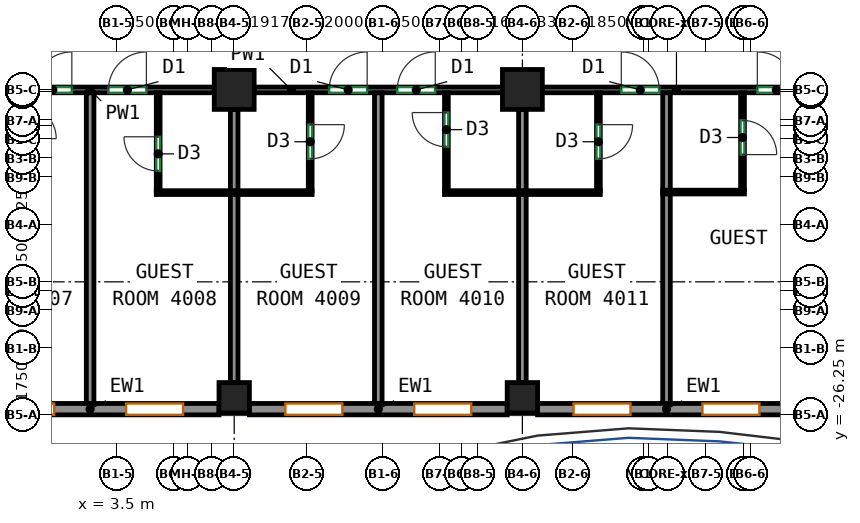
"""IFC4 building model, lengths in metres.
Left out: names, types, materials, properties, quantities, classifications, styles, units other than length and angle.
Written with IfcOpenShell. Run it as: python <this file> out.ifc"""

import sys

from ifc_helpers import new_model, si_unit, direction, frame, frame_2d, origin, origin_2d, place, context, subcontext, project, spatial, rectangle, extrude, source, transform, mapped, element, fill, save


model = new_model("IFC4")
c1 = context("Model", 3, precision=1e-05, world=origin(), true_north=direction((0.0, 1.0)))
c2 = subcontext(c1, "Body", "Model", "MODEL_VIEW")
j1 = project(units=[si_unit("LENGTHUNIT", "METRE"), si_unit("PLANEANGLEUNIT", "RADIAN")], contexts=[c1])
p1 = place(None, origin())
s1 = spatial("IfcSite", under=j1, at=p1, CompositionType="ELEMENT")
p2 = place(p1, origin())
s2 = spatial("IfcBuilding", under=s1, at=p2, CompositionType="ELEMENT")
p3 = place(p2, frame((0.0, 0.0, 171.9)))
s3 = spatial("IfcBuildingStorey", under=s2, at=p3, CompositionType="ELEMENT", Elevation=171.9)
m1 = source(origin(), c2, "Body", "SweptSolid", [
    extrude(rectangle(XDim=0.8, YDim=0.8, at=origin_2d()), origin(), (0.0, 0.0, 1.0), 3.12),
])
p4 = place(p3, frame((6.583, -25.8, 0.0), z_axis=(0.0, 0.0, 1.0), x_axis=(1.0, 0.0, 0.0)))
e1 = element("IfcColumn", 1, at=p4, inside=s3, PredefinedType="COLUMN", context=c2, shape_type="MappedRepresentation", body=[
    mapped(m1, transform((0.0, 0.0, 0.0))),
])
m2 = source(origin(), c2, "Body", "SweptSolid", [
    extrude(rectangle(XDim=1.05, YDim=1.05, at=origin_2d()), origin(), (0.0, 0.0, 1.0), 3.12),
])
p5 = place(p3, frame((6.583, -17.688, 0.0), z_axis=(0.0, 0.0, 1.0), x_axis=(1.0, 0.0, 0.0)))
e2 = element("IfcColumn", 2, at=p5, inside=s3, PredefinedType="COLUMN", context=c2, shape_type="MappedRepresentation", body=[
    mapped(m2, transform((0.0, 0.0, 0.0))),
])
p6 = place(p3, frame((14.167, -25.8, 0.0), z_axis=(0.0, 0.0, 1.0), x_axis=(1.0, 0.0, 0.0)))
e3 = element("IfcColumn", 3, at=p6, inside=s3, PredefinedType="COLUMN", context=c2, shape_type="MappedRepresentation", body=[
    mapped(m1, transform((0.0, 0.0, 0.0))),
])
p7 = place(p3, frame((14.167, -17.688, 0.0), z_axis=(0.0, 0.0, 1.0), x_axis=(1.0, 0.0, 0.0)))
e4 = element("IfcColumn", 4, at=p7, inside=s3, PredefinedType="COLUMN", context=c2, shape_type="MappedRepresentation", body=[
    mapped(m2, transform((0.0, 0.0, 0.0))),
])
m3 = source(origin(), c2, "Body", "SweptSolid", [
    extrude(rectangle(XDim=6.783, YDim=0.3, at=frame_2d((3.392, 0.0))), origin(), (0.0, 0.0, 1.0), 3.12),
])
p8 = place(p3, frame((-0.6, -26.1, 0.0), z_axis=(0.0, 0.0, 1.0), x_axis=(1.0, 0.0, 0.0)))
e5 = element("IfcWall", 5, at=p8, inside=s3, PredefinedType="SOLIDWALL", context=c2, shape_type="MappedRepresentation", body=[
    mapped(m3, transform((0.0, 0.0, 0.0))),
])
p9 = place(p8, frame((0.946, 0.0, 0.85)))
e6 = element("IfcOpeningElement", 6, at=p9, cuts=e5, PredefinedType="OPENING", context=c2, shape_type="SweptSolid", body=[
    extrude(rectangle(XDim=1.5, YDim=1.95, at=frame_2d((0.75, 0.975))), frame((0.0, 0.16, 0.0), z_axis=(0.0, -1.0, 0.0), x_axis=(1.0, 0.0, 0.0)), (0.0, 0.0, 1.0), 0.32),
])
p10 = place(p8, frame((4.337, 0.0, 0.85)))
e7 = element("IfcOpeningElement", 7, at=p10, cuts=e5, PredefinedType="OPENING", context=c2, shape_type="SweptSolid", body=[
    extrude(rectangle(XDim=1.5, YDim=1.95, at=frame_2d((0.75, 0.975))), frame((0.0, 0.16, 0.0), z_axis=(0.0, -1.0, 0.0), x_axis=(1.0, 0.0, 0.0)), (0.0, 0.0, 1.0), 0.32),
])
m4 = source(origin(), c2, "Body", "SweptSolid", [
    extrude(rectangle(XDim=6.783, YDim=0.3, at=frame_2d((3.392, 0.0))), origin(), (0.0, 0.0, 1.0), 3.12),
])
p11 = place(p3, frame((6.983, -26.1, 0.0), z_axis=(0.0, 0.0, 1.0), x_axis=(1.0, 0.0, 0.0)))
e8 = element("IfcWall", 8, at=p11, inside=s3, PredefinedType="SOLIDWALL", context=c2, shape_type="MappedRepresentation", body=[
    mapped(m4, transform((0.0, 0.0, 0.0))),
])
p12 = place(p11, frame((0.946, 0.0, 0.85)))
e9 = element("IfcOpeningElement", 9, at=p12, cuts=e8, PredefinedType="OPENING", context=c2, shape_type="SweptSolid", body=[
    extrude(rectangle(XDim=1.5, YDim=1.95, at=frame_2d((0.75, 0.975))), frame((0.0, 0.16, 0.0), z_axis=(0.0, -1.0, 0.0), x_axis=(1.0, 0.0, 0.0)), (0.0, 0.0, 1.0), 0.32),
])
p13 = place(p11, frame((4.338, 0.0, 0.85)))
e10 = element("IfcOpeningElement", 10, at=p13, cuts=e8, PredefinedType="OPENING", context=c2, shape_type="SweptSolid", body=[
    extrude(rectangle(XDim=1.5, YDim=1.95, at=frame_2d((0.75, 0.975))), frame((0.0, 0.16, 0.0), z_axis=(0.0, -1.0, 0.0), x_axis=(1.0, 0.0, 0.0)), (0.0, 0.0, 1.0), 0.32),
])
p14 = place(p3, frame((14.567, -26.1, 0.0), z_axis=(0.0, 0.0, 1.0), x_axis=(1.0, 0.0, 0.0)))
e11 = element("IfcWall", 11, at=p14, inside=s3, PredefinedType="SOLIDWALL", context=c2, shape_type="MappedRepresentation", body=[
    mapped(m3, transform((0.0, 0.0, 0.0))),
])
p15 = place(p14, frame((0.946, 0.0, 0.85)))
e12 = element("IfcOpeningElement", 12, at=p15, cuts=e11, PredefinedType="OPENING", context=c2, shape_type="SweptSolid", body=[
    extrude(rectangle(XDim=1.5, YDim=1.95, at=frame_2d((0.75, 0.975))), frame((0.0, 0.16, 0.0), z_axis=(0.0, -1.0, 0.0), x_axis=(1.0, 0.0, 0.0)), (0.0, 0.0, 1.0), 0.32),
])
p16 = place(p14, frame((4.337, 0.0, 0.85)))
e13 = element("IfcOpeningElement", 13, at=p16, cuts=e11, PredefinedType="OPENING", context=c2, shape_type="SweptSolid", body=[
    extrude(rectangle(XDim=1.5, YDim=1.95, at=frame_2d((0.75, 0.975))), frame((0.0, 0.16, 0.0), z_axis=(0.0, -1.0, 0.0), x_axis=(1.0, 0.0, 0.0)), (0.0, 0.0, 1.0), 0.32),
])
p17 = place(p3, frame((-0.475, -17.7, 0.0), z_axis=(0.0, 0.0, 1.0), x_axis=(1.0, 0.0, 0.0)))
e14 = element("IfcWall", 14, at=p17, inside=s3, PredefinedType="PARTITIONING", context=c2, shape_type="SweptSolid", body=[
    extrude(rectangle(XDim=6.533, YDim=0.15, at=frame_2d((3.267, 0.0))), origin(), (0.0, 0.0, 1.0), 3.12),
])
p18 = place(p17, frame((1.786, 0.0, 0.0)))
e15 = element("IfcOpeningElement", 15, at=p18, cuts=e14, PredefinedType="OPENING", context=c2, shape_type="SweptSolid", body=[
    extrude(rectangle(XDim=1.0, YDim=2.1, at=frame_2d((0.5, 1.05))), frame((0.0, 0.085, 0.0), z_axis=(0.0, -1.0, 0.0), x_axis=(1.0, 0.0, 0.0)), (0.0, 0.0, 1.0), 0.17),
])
p19 = place(p17, frame((3.748, 0.0, 0.0)))
e16 = element("IfcOpeningElement", 16, at=p19, cuts=e14, PredefinedType="OPENING", context=c2, shape_type="SweptSolid", body=[
    extrude(rectangle(XDim=1.0, YDim=2.1, at=frame_2d((0.5, 1.05))), frame((0.0, 0.085, 0.0), z_axis=(0.0, -1.0, 0.0), x_axis=(1.0, 0.0, 0.0)), (0.0, 0.0, 1.0), 0.17),
])
p20 = place(p3, frame((7.108, -17.7, 0.0), z_axis=(0.0, 0.0, 1.0), x_axis=(1.0, 0.0, 0.0)))
e17 = element("IfcWall", 17, at=p20, inside=s3, PredefinedType="PARTITIONING", context=c2, shape_type="SweptSolid", body=[
    extrude(rectangle(XDim=6.534, YDim=0.15, at=frame_2d((3.267, 0.0))), origin(), (0.0, 0.0, 1.0), 3.12),
])
p21 = place(p20, frame((1.974, 0.0, 0.0)))
e18 = element("IfcOpeningElement", 18, at=p21, cuts=e17, PredefinedType="OPENING", context=c2, shape_type="SweptSolid", body=[
    extrude(rectangle(XDim=1.0, YDim=2.1, at=frame_2d((0.5, 1.05))), frame((0.0, 0.085, 0.0), z_axis=(0.0, -1.0, 0.0), x_axis=(1.0, 0.0, 0.0)), (0.0, 0.0, 1.0), 0.17),
])
p22 = place(p20, frame((3.766, 0.0, 0.0)))
e19 = element("IfcOpeningElement", 19, at=p22, cuts=e17, PredefinedType="OPENING", context=c2, shape_type="SweptSolid", body=[
    extrude(rectangle(XDim=1.0, YDim=2.1, at=frame_2d((0.5, 1.05))), frame((0.0, 0.085, 0.0), z_axis=(0.0, -1.0, 0.0), x_axis=(1.0, 0.0, 0.0)), (0.0, 0.0, 1.0), 0.17),
])
p23 = place(p3, frame((14.692, -17.7, 0.0), z_axis=(0.0, 0.0, 1.0), x_axis=(1.0, 0.0, 0.0)))
e20 = element("IfcWall", 20, at=p23, inside=s3, PredefinedType="PARTITIONING", context=c2, shape_type="SweptSolid", body=[
    extrude(rectangle(XDim=7.058, YDim=0.15, at=frame_2d((3.529, 0.0))), origin(), (0.0, 0.0, 1.0), 2.52),
])
p24 = place(p23, frame((2.077, 0.0, 0.0)))
e21 = element("IfcOpeningElement", 21, at=p24, cuts=e20, PredefinedType="OPENING", context=c2, shape_type="SweptSolid", body=[
    extrude(rectangle(XDim=1.0, YDim=2.1, at=frame_2d((0.5, 1.05))), frame((0.0, 0.085, 0.0), z_axis=(0.0, -1.0, 0.0), x_axis=(1.0, 0.0, 0.0)), (0.0, 0.0, 1.0), 0.17),
])
p25 = place(p23, frame((5.657, 0.0, 0.0)))
e22 = element("IfcOpeningElement", 22, at=p25, cuts=e20, PredefinedType="OPENING", context=c2, shape_type="SweptSolid", body=[
    extrude(rectangle(XDim=1.0, YDim=2.1, at=frame_2d((0.5, 1.05))), frame((0.0, 0.085, 0.0), z_axis=(0.0, -1.0, 0.0), x_axis=(1.0, 0.0, 0.0)), (0.0, 0.0, 1.0), 0.17),
])
p26 = place(p3, frame((2.792, -26.0, 0.0), z_axis=(0.0, 0.0, 1.0), x_axis=(0.0, 1.0, 0.0)))
e23 = element("IfcWall", 23, at=p26, inside=s3, PredefinedType="PARTITIONING", context=c2, shape_type="SweptSolid", body=[
    extrude(rectangle(XDim=8.223, YDim=0.2, at=frame_2d((4.111, 0.0))), origin(), (0.0, 0.0, 1.0), 3.12),
])
p27 = place(p3, frame((4.583, -20.352, 0.0), z_axis=(0.0, 0.0, 1.0), x_axis=(0.0, 1.0, 0.0)))
e24 = element("IfcWall", 24, at=p27, inside=s3, PredefinedType="PARTITIONING", context=c2, shape_type="SweptSolid", body=[
    extrude(rectangle(XDim=2.575, YDim=0.1, at=frame_2d((1.288, 0.0))), origin(), (0.0, 0.0, 1.0), 3.12),
])
p28 = place(p27, frame((0.519, 0.0, 0.0)))
e25 = element("IfcOpeningElement", 25, at=p28, cuts=e24, PredefinedType="OPENING", context=c2, shape_type="SweptSolid", body=[
    extrude(rectangle(XDim=0.9, YDim=2.1, at=frame_2d((0.45, 1.05))), frame((0.0, 0.06, 0.0), z_axis=(0.0, -1.0, 0.0), x_axis=(1.0, 0.0, 0.0)), (0.0, 0.0, 1.0), 0.12),
])
p29 = place(p3, frame((4.533, -20.402, 0.0), z_axis=(0.0, 0.0, 1.0), x_axis=(1.0, 0.0, 0.0)))
e26 = element("IfcWall", 26, at=p29, inside=s3, PredefinedType="PARTITIONING", context=c2, shape_type="SweptSolid", body=[
    extrude(rectangle(XDim=4.1, YDim=0.1, at=frame_2d((2.05, 0.0))), origin(), (0.0, 0.0, 1.0), 3.12),
])
p30 = place(p3, frame((6.583, -25.4, 0.0), z_axis=(0.0, 0.0, 1.0), x_axis=(0.0, 1.0, 0.0)))
e27 = element("IfcWall", 27, at=p30, inside=s3, PredefinedType="PARTITIONING", context=c2, shape_type="SweptSolid", body=[
    extrude(rectangle(XDim=4.948, YDim=0.2, at=frame_2d((2.474, 0.0))), origin(), (0.0, 0.0, 1.0), 3.12),
])
p31 = place(p3, frame((6.583, -20.352, 0.0), z_axis=(0.0, 0.0, 1.0), x_axis=(0.0, 1.0, 0.0)))
e28 = element("IfcWall", 28, at=p31, inside=s3, PredefinedType="PARTITIONING", context=c2, shape_type="SweptSolid", body=[
    extrude(rectangle(XDim=2.14, YDim=0.2, at=frame_2d((1.07, 0.0))), origin(), (0.0, 0.0, 1.0), 3.12),
])
p32 = place(p3, frame((8.583, -17.777, 0.0), z_axis=(0.0, 0.0, 1.0), x_axis=(0.0, -1.0, 0.0)))
e29 = element("IfcWall", 29, at=p32, inside=s3, PredefinedType="PARTITIONING", context=c2, shape_type="SweptSolid", body=[
    extrude(rectangle(XDim=2.575, YDim=0.1, at=frame_2d((1.288, 0.0))), origin(), (0.0, 0.0, 1.0), 3.12),
])
p33 = place(p32, frame((0.837, 0.0, 0.0)))
e30 = element("IfcOpeningElement", 30, at=p33, cuts=e29, PredefinedType="OPENING", context=c2, shape_type="SweptSolid", body=[
    extrude(rectangle(XDim=0.9, YDim=2.1, at=frame_2d((0.45, 1.05))), frame((0.0, 0.06, 0.0), z_axis=(0.0, -1.0, 0.0), x_axis=(1.0, 0.0, 0.0)), (0.0, 0.0, 1.0), 0.12),
])
p34 = place(p3, frame((10.375, -26.0, 0.0), z_axis=(0.0, 0.0, 1.0), x_axis=(0.0, 1.0, 0.0)))
e31 = element("IfcWall", 31, at=p34, inside=s3, PredefinedType="PARTITIONING", context=c2, shape_type="SweptSolid", body=[
    extrude(rectangle(XDim=8.223, YDim=0.2, at=frame_2d((4.111, 0.0))), origin(), (0.0, 0.0, 1.0), 3.12),
])
p35 = place(p3, frame((12.167, -20.352, 0.0), z_axis=(0.0, 0.0, 1.0), x_axis=(0.0, 1.0, 0.0)))
e32 = element("IfcWall", 32, at=p35, inside=s3, PredefinedType="PARTITIONING", context=c2, shape_type="SweptSolid", body=[
    extrude(rectangle(XDim=2.575, YDim=0.1, at=frame_2d((1.288, 0.0))), origin(), (0.0, 0.0, 1.0), 3.12),
])
p36 = place(p35, frame((1.156, 0.0, 0.0)))
e33 = element("IfcOpeningElement", 33, at=p36, cuts=e32, PredefinedType="OPENING", context=c2, shape_type="SweptSolid", body=[
    extrude(rectangle(XDim=0.9, YDim=2.1, at=frame_2d((0.45, 1.05))), frame((0.0, 0.06, 0.0), z_axis=(0.0, -1.0, 0.0), x_axis=(1.0, 0.0, 0.0)), (0.0, 0.0, 1.0), 0.12),
])
p37 = place(p3, frame((12.117, -20.402, 0.0), z_axis=(0.0, 0.0, 1.0), x_axis=(1.0, 0.0, 0.0)))
e34 = element("IfcWall", 34, at=p37, inside=s3, PredefinedType="PARTITIONING", context=c2, shape_type="SweptSolid", body=[
    extrude(rectangle(XDim=4.1, YDim=0.1, at=frame_2d((2.05, 0.0))), origin(), (0.0, 0.0, 1.0), 3.12),
])
p38 = place(p3, frame((14.167, -25.4, 0.0), z_axis=(0.0, 0.0, 1.0), x_axis=(0.0, 1.0, 0.0)))
e35 = element("IfcWall", 35, at=p38, inside=s3, PredefinedType="PARTITIONING", context=c2, shape_type="SweptSolid", body=[
    extrude(rectangle(XDim=4.948, YDim=0.2, at=frame_2d((2.474, 0.0))), origin(), (0.0, 0.0, 1.0), 3.12),
])
p39 = place(p3, frame((14.167, -20.352, 0.0), z_axis=(0.0, 0.0, 1.0), x_axis=(0.0, 1.0, 0.0)))
e36 = element("IfcWall", 36, at=p39, inside=s3, PredefinedType="PARTITIONING", context=c2, shape_type="SweptSolid", body=[
    extrude(rectangle(XDim=2.14, YDim=0.2, at=frame_2d((1.07, 0.0))), origin(), (0.0, 0.0, 1.0), 3.12),
])
p40 = place(p3, frame((16.167, -17.777, 0.0), z_axis=(0.0, 0.0, 1.0), x_axis=(0.0, -1.0, 0.0)))
e37 = element("IfcWall", 37, at=p40, inside=s3, PredefinedType="PARTITIONING", context=c2, shape_type="SweptSolid", body=[
    extrude(rectangle(XDim=2.575, YDim=0.1, at=frame_2d((1.288, 0.0))), origin(), (0.0, 0.0, 1.0), 3.12),
])
p41 = place(p40, frame((0.837, 0.0, 0.0)))
e38 = element("IfcOpeningElement", 38, at=p41, cuts=e37, PredefinedType="OPENING", context=c2, shape_type="SweptSolid", body=[
    extrude(rectangle(XDim=0.9, YDim=2.1, at=frame_2d((0.45, 1.05))), frame((0.0, 0.06, 0.0), z_axis=(0.0, -1.0, 0.0), x_axis=(1.0, 0.0, 0.0)), (0.0, 0.0, 1.0), 0.12),
])
p42 = place(p3, frame((17.959, -26.0, 0.0), z_axis=(0.0, 0.0, 1.0), x_axis=(0.0, 1.0, 0.0)))
e39 = element("IfcWall", 39, at=p42, inside=s3, PredefinedType="PARTITIONING", context=c2, shape_type="SweptSolid", body=[
    extrude(rectangle(XDim=5.572, YDim=0.2, at=frame_2d((2.786, 0.0))), origin(), (0.0, 0.0, 1.0), 3.12),
])
p43 = place(p3, frame((17.959, -20.348, 0.0), z_axis=(0.0, 0.0, 1.0), x_axis=(0.0, 1.0, 0.0)))
e40 = element("IfcWall", 40, at=p43, inside=s3, PredefinedType="PARTITIONING", context=c2, shape_type="SweptSolid", body=[
    extrude(rectangle(XDim=2.571, YDim=0.2, at=frame_2d((1.285, 0.0))), origin(), (0.0, 0.0, 1.0), 3.12),
])
p44 = place(p3, frame((17.859, -20.388, 0.0), z_axis=(0.0, 0.0, 1.0), x_axis=(1.0, 0.0, 0.0)))
e41 = element("IfcWall", 41, at=p44, inside=s3, PredefinedType="PARTITIONING", context=c2, shape_type="SweptSolid", body=[
    extrude(rectangle(XDim=2.15, YDim=0.1, at=frame_2d((1.075, 0.0))), origin(), (0.0, 0.0, 1.0), 3.12),
])
p45 = place(p3, frame((19.959, -17.777, 0.0), z_axis=(0.0, 0.0, 1.0), x_axis=(0.0, -1.0, 0.0)))
e42 = element("IfcWall", 42, at=p45, inside=s3, PredefinedType="PARTITIONING", context=c2, shape_type="SweptSolid", body=[
    extrude(rectangle(XDim=2.561, YDim=0.1, at=frame_2d((1.28, 0.0))), origin(), (0.0, 0.0, 1.0), 3.12),
])
p46 = place(p45, frame((0.725, 0.0, 0.0)))
e43 = element("IfcOpeningElement", 43, at=p46, cuts=e42, PredefinedType="OPENING", context=c2, shape_type="SweptSolid", body=[
    extrude(rectangle(XDim=0.9, YDim=2.1, at=frame_2d((0.45, 1.05))), frame((0.0, 0.06, 0.0), z_axis=(0.0, -1.0, 0.0), x_axis=(1.0, 0.0, 0.0)), (0.0, 0.0, 1.0), 0.12),
])
p47 = place(p9, origin())
e44 = element("IfcWindow", 44, at=p47, inside=s3, PartitioningType="SINGLE_PANEL", PredefinedType="WINDOW", context=c2, shape_type="SweptSolid", body=[
    extrude(rectangle(XDim=1.5, YDim=1.95, at=frame_2d((0.75, 0.975))), frame((0.0, 0.03, 0.0), z_axis=(0.0, -1.0, 0.0), x_axis=(1.0, 0.0, 0.0)), (0.0, 0.0, 1.0), 0.06),
])
fill(e6, e44)
p48 = place(p10, origin())
e45 = element("IfcWindow", 45, at=p48, inside=s3, PartitioningType="SINGLE_PANEL", PredefinedType="WINDOW", context=c2, shape_type="SweptSolid", body=[
    extrude(rectangle(XDim=1.5, YDim=1.95, at=frame_2d((0.75, 0.975))), frame((0.0, 0.03, 0.0), z_axis=(0.0, -1.0, 0.0), x_axis=(1.0, 0.0, 0.0)), (0.0, 0.0, 1.0), 0.06),
])
fill(e7, e45)
p49 = place(p12, origin())
e46 = element("IfcWindow", 46, at=p49, inside=s3, PartitioningType="SINGLE_PANEL", PredefinedType="WINDOW", context=c2, shape_type="SweptSolid", body=[
    extrude(rectangle(XDim=1.5, YDim=1.95, at=frame_2d((0.75, 0.975))), frame((0.0, 0.03, 0.0), z_axis=(0.0, -1.0, 0.0), x_axis=(1.0, 0.0, 0.0)), (0.0, 0.0, 1.0), 0.06),
])
fill(e9, e46)
p50 = place(p13, origin())
e47 = element("IfcWindow", 47, at=p50, inside=s3, PartitioningType="SINGLE_PANEL", PredefinedType="WINDOW", context=c2, shape_type="SweptSolid", body=[
    extrude(rectangle(XDim=1.5, YDim=1.95, at=frame_2d((0.75, 0.975))), frame((0.0, 0.03, 0.0), z_axis=(0.0, -1.0, 0.0), x_axis=(1.0, 0.0, 0.0)), (0.0, 0.0, 1.0), 0.06),
])
fill(e10, e47)
p51 = place(p15, origin())
e48 = element("IfcWindow", 48, at=p51, inside=s3, PartitioningType="SINGLE_PANEL", PredefinedType="WINDOW", context=c2, shape_type="SweptSolid", body=[
    extrude(rectangle(XDim=1.5, YDim=1.95, at=frame_2d((0.75, 0.975))), frame((0.0, 0.03, 0.0), z_axis=(0.0, -1.0, 0.0), x_axis=(1.0, 0.0, 0.0)), (0.0, 0.0, 1.0), 0.06),
])
fill(e12, e48)
p52 = place(p16, origin())
e49 = element("IfcWindow", 49, at=p52, inside=s3, PartitioningType="SINGLE_PANEL", PredefinedType="WINDOW", context=c2, shape_type="SweptSolid", body=[
    extrude(rectangle(XDim=1.5, YDim=1.95, at=frame_2d((0.75, 0.975))), frame((0.0, 0.03, 0.0), z_axis=(0.0, -1.0, 0.0), x_axis=(1.0, 0.0, 0.0)), (0.0, 0.0, 1.0), 0.06),
])
fill(e13, e49)
p53 = place(p28, origin())
e50 = element("IfcDoor", 50, at=p53, inside=s3, OperationType="SINGLE_SWING_RIGHT", PredefinedType="DOOR", context=c2, shape_type="SweptSolid", body=[
    extrude(rectangle(XDim=0.9, YDim=2.1, at=frame_2d((0.45, 1.05))), frame((0.0, 0.025, 0.0), z_axis=(0.0, -1.0, 0.0), x_axis=(1.0, 0.0, 0.0)), (0.0, 0.0, 1.0), 0.05),
])
fill(e25, e50)
p54 = place(p33, origin())
e51 = element("IfcDoor", 51, at=p54, inside=s3, OperationType="SINGLE_SWING_LEFT", PredefinedType="DOOR", context=c2, shape_type="SweptSolid", body=[
    extrude(rectangle(XDim=0.9, YDim=2.1, at=frame_2d((0.45, 1.05))), frame((0.0, 0.025, 0.0), z_axis=(0.0, -1.0, 0.0), x_axis=(1.0, 0.0, 0.0)), (0.0, 0.0, 1.0), 0.05),
])
fill(e30, e51)
p55 = place(p41, origin())
e52 = element("IfcDoor", 52, at=p55, inside=s3, OperationType="SINGLE_SWING_LEFT", PredefinedType="DOOR", context=c2, shape_type="SweptSolid", body=[
    extrude(rectangle(XDim=0.9, YDim=2.1, at=frame_2d((0.45, 1.05))), frame((0.0, 0.025, 0.0), z_axis=(0.0, -1.0, 0.0), x_axis=(1.0, 0.0, 0.0)), (0.0, 0.0, 1.0), 0.05),
])
fill(e38, e52)
p56 = place(p46, origin())
e53 = element("IfcDoor", 53, at=p56, inside=s3, OperationType="SINGLE_SWING_RIGHT", PredefinedType="DOOR", context=c2, shape_type="SweptSolid", body=[
    extrude(rectangle(XDim=0.9, YDim=2.1, at=frame_2d((0.45, 1.05))), frame((0.0, 0.025, 0.0), z_axis=(0.0, -1.0, 0.0), x_axis=(1.0, 0.0, 0.0)), (0.0, 0.0, 1.0), 0.05),
])
fill(e43, e53)
p57 = place(p36, origin())
e54 = element("IfcDoor", 54, at=p57, inside=s3, OperationType="SINGLE_SWING_RIGHT", PredefinedType="DOOR", context=c2, shape_type="SweptSolid", body=[
    extrude(rectangle(XDim=0.9, YDim=2.1, at=frame_2d((0.45, 1.05))), frame((0.0, 0.025, 0.0), z_axis=(0.0, -1.0, 0.0), x_axis=(1.0, 0.0, 0.0)), (0.0, 0.0, 1.0), 0.05),
])
fill(e33, e54)
p58 = place(p18, origin())
e55 = element("IfcDoor", 55, at=p58, inside=s3, OperationType="SINGLE_SWING_RIGHT", PredefinedType="DOOR", context=c2, shape_type="SweptSolid", body=[
    extrude(rectangle(XDim=1.0, YDim=2.1, at=frame_2d((0.5, 1.05))), frame((0.0, 0.025, 0.0), z_axis=(0.0, -1.0, 0.0), x_axis=(1.0, 0.0, 0.0)), (0.0, 0.0, 1.0), 0.05),
])
fill(e15, e55)
p59 = place(p19, origin())
e56 = element("IfcDoor", 56, at=p59, inside=s3, OperationType="SINGLE_SWING_RIGHT", PredefinedType="DOOR", context=c2, shape_type="SweptSolid", body=[
    extrude(rectangle(XDim=1.0, YDim=2.1, at=frame_2d((0.5, 1.05))), frame((0.0, 0.025, 0.0), z_axis=(0.0, -1.0, 0.0), x_axis=(1.0, 0.0, 0.0)), (0.0, 0.0, 1.0), 0.05),
])
fill(e16, e56)
p60 = place(p21, origin())
e57 = element("IfcDoor", 57, at=p60, inside=s3, OperationType="SINGLE_SWING_RIGHT", PredefinedType="DOOR", context=c2, shape_type="SweptSolid", body=[
    extrude(rectangle(XDim=1.0, YDim=2.1, at=frame_2d((0.5, 1.05))), frame((0.0, 0.025, 0.0), z_axis=(0.0, -1.0, 0.0), x_axis=(1.0, 0.0, 0.0)), (0.0, 0.0, 1.0), 0.05),
])
fill(e18, e57)
p61 = place(p22, origin())
e58 = element("IfcDoor", 58, at=p61, inside=s3, OperationType="SINGLE_SWING_RIGHT", PredefinedType="DOOR", context=c2, shape_type="SweptSolid", body=[
    extrude(rectangle(XDim=1.0, YDim=2.1, at=frame_2d((0.5, 1.05))), frame((0.0, 0.025, 0.0), z_axis=(0.0, -1.0, 0.0), x_axis=(1.0, 0.0, 0.0)), (0.0, 0.0, 1.0), 0.05),
])
fill(e19, e58)
p62 = place(p24, origin())
e59 = element("IfcDoor", 59, at=p62, inside=s3, OperationType="SINGLE_SWING_LEFT", PredefinedType="DOOR", context=c2, shape_type="SweptSolid", body=[
    extrude(rectangle(XDim=1.0, YDim=2.1, at=frame_2d((0.5, 1.05))), frame((0.0, 0.025, 0.0), z_axis=(0.0, -1.0, 0.0), x_axis=(1.0, 0.0, 0.0)), (0.0, 0.0, 1.0), 0.05),
])
fill(e21, e59)
p63 = place(p25, origin())
e60 = element("IfcDoor", 60, at=p63, inside=s3, OperationType="SINGLE_SWING_LEFT", PredefinedType="DOOR", context=c2, shape_type="SweptSolid", body=[
    extrude(rectangle(XDim=1.0, YDim=2.1, at=frame_2d((0.5, 1.05))), frame((0.0, 0.025, 0.0), z_axis=(0.0, -1.0, 0.0), x_axis=(1.0, 0.0, 0.0)), (0.0, 0.0, 1.0), 0.05),
])
fill(e22, e60)
save(model, sys.argv[1])
